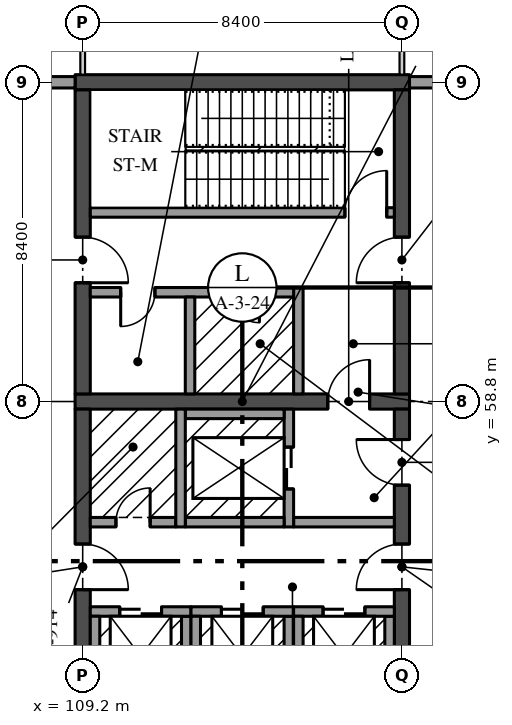
"""IFC4 building model, lengths in metres.
Left out: names, types, materials, properties, quantities, classifications, styles, units other than length and angle.
Written with IfcOpenShell. Run it as: python <this file> out.ifc"""

import sys

from ifc_helpers import new_model, si_unit, direction, frame, frame_2d, origin, place, context, subcontext, project, spatial, rectangle, extrude, element, fill, save


model = new_model("IFC4")
c1 = context("Model", 3, precision=1e-05, world=origin(), true_north=direction((0.0, 1.0)))
c2 = subcontext(c1, "Body", "Model", "MODEL_VIEW")
j1 = project(units=[si_unit("LENGTHUNIT", "METRE"), si_unit("PLANEANGLEUNIT", "RADIAN")], contexts=[c1])
p1 = place(None, origin())
s1 = spatial("IfcSite", under=j1, at=p1, CompositionType="ELEMENT")
p2 = place(p1, origin())
s2 = spatial("IfcBuilding", under=s1, at=p2, CompositionType="ELEMENT")
p3 = place(p2, frame((0.0, 0.0, 9.9)))
s3 = spatial("IfcBuildingStorey", under=s2, at=p3, CompositionType="ELEMENT", Elevation=9.9)
p4 = place(p3, frame((109.0, 58.8, 0.0), z_axis=(0.0, 0.0, 1.0), x_axis=(1.0, 0.0, 0.0)))
e1 = element("IfcWall", 1, at=p4, inside=s3, PredefinedType="SHEAR", context=c2, shape_type="SweptSolid", body=[
    extrude(rectangle(XDim=8.8, YDim=0.4, at=frame_2d((4.4, 0.0))), origin(), (0.0, 0.0, 1.0), 4.37),
])
p5 = place(p4, frame((6.65, 0.0, 0.0)))
e2 = element("IfcOpeningElement", 2, at=p5, cuts=e1, PredefinedType="OPENING", context=c2, shape_type="SweptSolid", body=[
    extrude(rectangle(XDim=1.1, YDim=2.1, at=frame_2d((0.55, 1.05))), frame((0.0, 0.21, 0.0), z_axis=(0.0, -1.0, 0.0), x_axis=(1.0, 0.0, 0.0)), (0.0, 0.0, 1.0), 0.42),
])
p6 = place(p3, frame((109.2, 50.6, 0.0), z_axis=(0.0, 0.0, 1.0), x_axis=(0.0, 1.0, 0.0)))
e3 = element("IfcWall", 3, at=p6, inside=s3, PredefinedType="SHEAR", context=c2, shape_type="SweptSolid", body=[
    extrude(rectangle(XDim=8.0, YDim=0.4, at=frame_2d((4.0, 0.0))), origin(), (0.0, 0.0, 1.0), 4.37),
])
p7 = place(p6, frame((3.25, 0.0, 0.0)))
e4 = element("IfcOpeningElement", 4, at=p7, cuts=e3, PredefinedType="OPENING", context=c2, shape_type="SweptSolid", body=[
    extrude(rectangle(XDim=1.2, YDim=2.1, at=frame_2d((0.6, 1.05))), frame((0.0, 0.21, 0.0), z_axis=(0.0, -1.0, 0.0), x_axis=(1.0, 0.0, 0.0)), (0.0, 0.0, 1.0), 0.42),
])
p8 = place(p3, frame((117.6, 50.6, 0.0), z_axis=(0.0, 0.0, 1.0), x_axis=(0.0, 1.0, 0.0)))
e5 = element("IfcWall", 5, at=p8, inside=s3, PredefinedType="SHEAR", context=c2, shape_type="SweptSolid", body=[
    extrude(rectangle(XDim=8.0, YDim=0.4, at=frame_2d((4.0, 0.0))), origin(), (0.0, 0.0, 1.0), 4.37),
])
p9 = place(p8, frame((3.25, 0.0, 0.0)))
e6 = element("IfcOpeningElement", 6, at=p9, cuts=e5, PredefinedType="OPENING", context=c2, shape_type="SweptSolid", body=[
    extrude(rectangle(XDim=1.2, YDim=2.1, at=frame_2d((0.6, 1.05))), frame((0.0, 0.21, 0.0), z_axis=(0.0, -1.0, 0.0), x_axis=(1.0, 0.0, 0.0)), (0.0, 0.0, 1.0), 0.42),
])
p10 = place(p8, frame((6.0, 0.0, 0.0)))
e7 = element("IfcOpeningElement", 7, at=p10, cuts=e5, PredefinedType="OPENING", context=c2, shape_type="SweptSolid", body=[
    extrude(rectangle(XDim=1.2, YDim=2.1, at=frame_2d((0.6, 1.05))), frame((0.0, 0.21, 0.0), z_axis=(0.0, -1.0, 0.0), x_axis=(1.0, 0.0, 0.0)), (0.0, 0.0, 1.0), 0.42),
])
p11 = place(p3, frame((109.4, 55.625, 0.0), z_axis=(0.0, 0.0, 1.0), x_axis=(1.0, 0.0, 0.0)))
e8 = element("IfcWall", 8, at=p11, inside=s3, PredefinedType="SOLIDWALL", context=c2, shape_type="SweptSolid", body=[
    extrude(rectangle(XDim=2.25, YDim=0.25, at=frame_2d((1.125, 0.0))), origin(), (0.0, 0.0, 1.0), 4.37),
])
p12 = place(p11, frame((0.675, 0.0, 0.0)))
e9 = element("IfcOpeningElement", 9, at=p12, cuts=e8, PredefinedType="OPENING", context=c2, shape_type="SweptSolid", body=[
    extrude(rectangle(XDim=0.9, YDim=2.1, at=frame_2d((0.45, 1.05))), frame((0.0, 0.135, 0.0), z_axis=(0.0, -1.0, 0.0), x_axis=(1.0, 0.0, 0.0)), (0.0, 0.0, 1.0), 0.27),
])
p13 = place(p3, frame((114.75, 55.625, 0.0), z_axis=(0.0, 0.0, 1.0), x_axis=(1.0, 0.0, 0.0)))
e10 = element("IfcWall", 10, at=p13, inside=s3, PredefinedType="SOLIDWALL", context=c2, shape_type="SweptSolid", body=[
    extrude(rectangle(XDim=2.65, YDim=0.25, at=frame_2d((1.325, 0.0))), origin(), (0.0, 0.0, 1.0), 4.37),
])
p14 = place(p3, frame((109.0, 67.2, 0.0), z_axis=(0.0, 0.0, 1.0), x_axis=(1.0, 0.0, 0.0)))
e11 = element("IfcWall", 11, at=p14, inside=s3, PredefinedType="SHEAR", context=c2, shape_type="SweptSolid", body=[
    extrude(rectangle(XDim=8.8, YDim=0.4, at=frame_2d((4.4, 0.0))), origin(), (0.0, 0.0, 1.0), 4.37),
])
p15 = place(p3, frame((109.2, 59.0, 0.0), z_axis=(0.0, 0.0, 1.0), x_axis=(0.0, 1.0, 0.0)))
e12 = element("IfcWall", 12, at=p15, inside=s3, PredefinedType="SHEAR", context=c2, shape_type="SweptSolid", body=[
    extrude(rectangle(XDim=8.0, YDim=0.4, at=frame_2d((4.0, 0.0))), origin(), (0.0, 0.0, 1.0), 4.37),
])
p16 = place(p15, frame((2.925, 0.0, 0.0)))
e13 = element("IfcOpeningElement", 13, at=p16, cuts=e12, PredefinedType="OPENING", context=c2, shape_type="SweptSolid", body=[
    extrude(rectangle(XDim=1.2, YDim=2.1, at=frame_2d((0.6, 1.05))), frame((0.0, 0.21, 0.0), z_axis=(0.0, -1.0, 0.0), x_axis=(1.0, 0.0, 0.0)), (0.0, 0.0, 1.0), 0.42),
])
p17 = place(p3, frame((117.6, 59.0, 0.0), z_axis=(0.0, 0.0, 1.0), x_axis=(0.0, 1.0, 0.0)))
e14 = element("IfcWall", 14, at=p17, inside=s3, PredefinedType="SHEAR", context=c2, shape_type="SweptSolid", body=[
    extrude(rectangle(XDim=8.0, YDim=0.4, at=frame_2d((4.0, 0.0))), origin(), (0.0, 0.0, 1.0), 4.37),
])
p18 = place(p17, frame((2.925, 0.0, 0.0)))
e15 = element("IfcOpeningElement", 15, at=p18, cuts=e14, PredefinedType="OPENING", context=c2, shape_type="SweptSolid", body=[
    extrude(rectangle(XDim=1.2, YDim=2.1, at=frame_2d((0.6, 1.05))), frame((0.0, 0.21, 0.0), z_axis=(0.0, -1.0, 0.0), x_axis=(1.0, 0.0, 0.0)), (0.0, 0.0, 1.0), 0.42),
])
p19 = place(p3, frame((117.4, 63.775, 0.0), z_axis=(0.0, 0.0, 1.0), x_axis=(-1.0, 0.0, 0.0)))
e16 = element("IfcWall", 16, at=p19, inside=s3, PredefinedType="SOLIDWALL", context=c2, shape_type="SweptSolid", body=[
    extrude(rectangle(XDim=8.0, YDim=0.25, at=frame_2d((4.0, 0.0))), origin(), (0.0, 0.0, 1.0), 4.37),
])
p20 = place(p19, frame((0.2, 0.0, 0.0)))
e17 = element("IfcOpeningElement", 17, at=p20, cuts=e16, PredefinedType="OPENING", context=c2, shape_type="SweptSolid", body=[
    extrude(rectangle(XDim=1.1, YDim=2.1, at=frame_2d((0.55, 1.05))), frame((0.0, 0.135, 0.0), z_axis=(0.0, -1.0, 0.0), x_axis=(1.0, 0.0, 0.0)), (0.0, 0.0, 1.0), 0.27),
])
p21 = place(p3, frame((114.875, 61.8, 0.0), z_axis=(0.0, 0.0, 1.0), x_axis=(0.0, -1.0, 0.0)))
e18 = element("IfcWall", 18, at=p21, inside=s3, PredefinedType="SOLIDWALL", context=c2, shape_type="SweptSolid", body=[
    extrude(rectangle(XDim=2.8, YDim=0.25, at=frame_2d((1.4, 0.0))), origin(), (0.0, 0.0, 1.0), 4.37),
])
p22 = place(p3, frame((114.75, 61.675, 0.0), z_axis=(0.0, 0.0, 1.0), x_axis=(-1.0, 0.0, 0.0)))
e19 = element("IfcWall", 19, at=p22, inside=s3, PredefinedType="SOLIDWALL", context=c2, shape_type="SweptSolid", body=[
    extrude(rectangle(XDim=5.35, YDim=0.25, at=frame_2d((2.675, 0.0))), origin(), (0.0, 0.0, 1.0), 4.37),
])
p23 = place(p22, frame((3.65, 0.0, 0.0)))
e20 = element("IfcOpeningElement", 20, at=p23, cuts=e19, PredefinedType="OPENING", context=c2, shape_type="SweptSolid", body=[
    extrude(rectangle(XDim=0.9, YDim=2.1, at=frame_2d((0.45, 1.05))), frame((0.0, 0.135, 0.0), z_axis=(0.0, -1.0, 0.0), x_axis=(1.0, 0.0, 0.0)), (0.0, 0.0, 1.0), 0.27),
])
p24 = place(p22, frame((0.9, 0.0, 0.0)))
e21 = element("IfcOpeningElement", 21, at=p24, cuts=e19, PredefinedType="OPENING", context=c2, shape_type="SweptSolid", body=[
    extrude(rectangle(XDim=0.8, YDim=2.1, at=frame_2d((0.4, 1.05))), frame((0.0, 0.135, 0.0), z_axis=(0.0, -1.0, 0.0), x_axis=(1.0, 0.0, 0.0)), (0.0, 0.0, 1.0), 0.27),
])
p25 = place(p3, frame((112.025, 61.55, 0.0), z_axis=(0.0, 0.0, 1.0), x_axis=(0.0, -1.0, 0.0)))
e22 = element("IfcWall", 22, at=p25, inside=s3, PredefinedType="SOLIDWALL", context=c2, shape_type="SweptSolid", body=[
    extrude(rectangle(XDim=2.55, YDim=0.25, at=frame_2d((1.275, 0.0))), origin(), (0.0, 0.0, 1.0), 4.37),
])
p26 = place(p3, frame((114.625, 55.5, 0.0), z_axis=(0.0, 0.0, 1.0), x_axis=(0.0, 1.0, 0.0)))
e23 = element("IfcWall", 23, at=p26, inside=s3, PredefinedType="SOLIDWALL", context=c2, shape_type="SweptSolid", body=[
    extrude(rectangle(XDim=3.1, YDim=0.25, at=frame_2d((1.55, 0.0))), origin(), (0.0, 0.0, 1.0), 4.37),
])
p27 = place(p26, frame((1.0, 0.0, 0.0)))
e24 = element("IfcOpeningElement", 24, at=p27, cuts=e23, PredefinedType="OPENING", context=c2, shape_type="SweptSolid", body=[
    extrude(rectangle(XDim=1.1, YDim=2.1, at=frame_2d((0.55, 1.05))), frame((0.0, 0.135, 0.0), z_axis=(0.0, -1.0, 0.0), x_axis=(1.0, 0.0, 0.0)), (0.0, 0.0, 1.0), 0.27),
])
for number, where, z_axis, x_axis in (
    (25, (111.9, 58.475, 0.0), (0.0, 0.0, 1.0), (1.0, 0.0, 0.0)),
    (26, (111.9, 55.625, 0.0), (0.0, 0.0, 1.0), (1.0, 0.0, 0.0)),
):
    element("IfcWall", number, at=place(p3, frame(where, z_axis=z_axis, x_axis=x_axis)), inside=s3, PredefinedType="SOLIDWALL", context=c2, shape_type="SweptSolid", body=[
        extrude(rectangle(XDim=2.6, YDim=0.25, at=frame_2d((1.3, 0.0))), origin(), (0.0, 0.0, 1.0), 4.37),
    ])
p28 = place(p3, frame((111.775, 55.5, 0.0), z_axis=(0.0, 0.0, 1.0), x_axis=(0.0, 1.0, 0.0)))
e27 = element("IfcWall", 27, at=p28, inside=s3, PredefinedType="SOLIDWALL", context=c2, shape_type="SweptSolid", body=[
    extrude(rectangle(XDim=3.1, YDim=0.25, at=frame_2d((1.55, 0.0))), origin(), (0.0, 0.0, 1.0), 4.37),
])
p29 = place(p3, frame((111.925, 50.85, 0.0), z_axis=(0.0, 0.0, 1.0), x_axis=(0.0, 1.0, 0.0)))
e28 = element("IfcWall", 28, at=p29, inside=s3, PredefinedType="SOLIDWALL", context=c2, shape_type="SweptSolid", body=[
    extrude(rectangle(XDim=2.3, YDim=0.25, at=frame_2d((1.15, 0.0))), origin(), (0.0, 0.0, 1.0), 4.37),
])
p30 = place(p3, frame((109.4, 53.275, 0.0), z_axis=(0.0, 0.0, 1.0), x_axis=(1.0, 0.0, 0.0)))
e29 = element("IfcWall", 29, at=p30, inside=s3, PredefinedType="SOLIDWALL", context=c2, shape_type="SweptSolid", body=[
    extrude(rectangle(XDim=2.65, YDim=0.25, at=frame_2d((1.325, 0.0))), origin(), (0.0, 0.0, 1.0), 4.37),
])
p31 = place(p30, frame((0.775, 0.0, 0.0)))
e30 = element("IfcOpeningElement", 30, at=p31, cuts=e29, PredefinedType="OPENING", context=c2, shape_type="SweptSolid", body=[
    extrude(rectangle(XDim=1.1, YDim=2.1, at=frame_2d((0.55, 1.05))), frame((0.0, 0.135, 0.0), z_axis=(0.0, -1.0, 0.0), x_axis=(1.0, 0.0, 0.0)), (0.0, 0.0, 1.0), 0.27),
])
for number, where, z_axis, x_axis in (
    (31, (109.525, 50.85, 0.0), (0.0, 0.0, 1.0), (0.0, 1.0, 0.0)),
    (32, (114.625, 50.85, 0.0), (0.0, 0.0, 1.0), (0.0, 1.0, 0.0)),
):
    element("IfcWall", number, at=place(p3, frame(where, z_axis=z_axis, x_axis=x_axis)), inside=s3, PredefinedType="SOLIDWALL", context=c2, shape_type="SweptSolid", body=[
        extrude(rectangle(XDim=2.3, YDim=0.25, at=frame_2d((1.15, 0.0))), origin(), (0.0, 0.0, 1.0), 4.37),
    ])
p32 = place(p3, frame((112.05, 53.275, 0.0), z_axis=(0.0, 0.0, 1.0), x_axis=(1.0, 0.0, 0.0)))
e33 = element("IfcWall", 33, at=p32, inside=s3, PredefinedType="SOLIDWALL", context=c2, shape_type="SweptSolid", body=[
    extrude(rectangle(XDim=2.7, YDim=0.25, at=frame_2d((1.35, 0.0))), origin(), (0.0, 0.0, 1.0), 4.37),
])
p33 = place(p32, frame((0.8, 0.0, 0.0)))
e34 = element("IfcOpeningElement", 34, at=p33, cuts=e33, PredefinedType="OPENING", context=c2, shape_type="SweptSolid", body=[
    extrude(rectangle(XDim=1.1, YDim=2.1, at=frame_2d((0.55, 1.05))), frame((0.0, 0.135, 0.0), z_axis=(0.0, -1.0, 0.0), x_axis=(1.0, 0.0, 0.0)), (0.0, 0.0, 1.0), 0.27),
])
for number, where, z_axis, x_axis in (
    (35, (112.175, 50.85, 0.0), (0.0, 0.0, 1.0), (0.0, 1.0, 0.0)),
    (36, (117.275, 50.85, 0.0), (0.0, 0.0, 1.0), (0.0, 1.0, 0.0)),
):
    element("IfcWall", number, at=place(p3, frame(where, z_axis=z_axis, x_axis=x_axis)), inside=s3, PredefinedType="SOLIDWALL", context=c2, shape_type="SweptSolid", body=[
        extrude(rectangle(XDim=2.3, YDim=0.25, at=frame_2d((1.15, 0.0))), origin(), (0.0, 0.0, 1.0), 4.37),
    ])
p34 = place(p3, frame((114.75, 53.275, 0.0), z_axis=(0.0, 0.0, 1.0), x_axis=(1.0, 0.0, 0.0)))
e37 = element("IfcWall", 37, at=p34, inside=s3, PredefinedType="SOLIDWALL", context=c2, shape_type="SweptSolid", body=[
    extrude(rectangle(XDim=2.65, YDim=0.25, at=frame_2d((1.325, 0.0))), origin(), (0.0, 0.0, 1.0), 4.37),
])
p35 = place(p34, frame((0.775, 0.0, 0.0)))
e38 = element("IfcOpeningElement", 38, at=p35, cuts=e37, PredefinedType="OPENING", context=c2, shape_type="SweptSolid", body=[
    extrude(rectangle(XDim=1.1, YDim=2.1, at=frame_2d((0.55, 1.05))), frame((0.0, 0.135, 0.0), z_axis=(0.0, -1.0, 0.0), x_axis=(1.0, 0.0, 0.0)), (0.0, 0.0, 1.0), 0.27),
])
p36 = place(p3, frame((114.875, 50.85, 0.0), z_axis=(0.0, 0.0, 1.0), x_axis=(0.0, 1.0, 0.0)))
e39 = element("IfcWall", 39, at=p36, inside=s3, PredefinedType="SOLIDWALL", context=c2, shape_type="SweptSolid", body=[
    extrude(rectangle(XDim=2.3, YDim=0.25, at=frame_2d((1.15, 0.0))), origin(), (0.0, 0.0, 1.0), 4.37),
])
for number, where, z_axis, x_axis in (
    (40, (109.2, 67.4, 0.0), (0.0, 0.0, 1.0), (0.0, 1.0, 0.0)),
    (41, (117.6, 67.4, 0.0), (0.0, 0.0, 1.0), (0.0, 1.0, 0.0)),
):
    element("IfcWall", number, at=place(p3, frame(where, z_axis=z_axis, x_axis=x_axis)), inside=s3, PredefinedType="PARTITIONING", context=c2, shape_type="SweptSolid", body=[
        extrude(rectangle(XDim=6.625, YDim=0.125, at=frame_2d((3.312, 0.0))), origin(), (0.0, 0.0, 1.0), 3.746),
    ])
for number, where, z_axis, x_axis in (
    (42, (125.999, 67.2, 0.0), (0.0, 0.0, 1.0), (-1.0, 0.0, 0.0)),
    (43, (109.0, 67.2, 0.0), (0.0, 0.0, 1.0), (-1.0, 0.0, 0.0)),
):
    element("IfcWall", number, at=place(p3, frame(where, z_axis=z_axis, x_axis=x_axis)), inside=s3, PredefinedType="SOLIDWALL", context=c2, shape_type="SweptSolid", body=[
        extrude(rectangle(XDim=8.198, YDim=0.3, at=frame_2d((4.099, 0.0))), origin(), (0.0, 0.0, 1.0), 3.746),
    ])
p37 = place(p7, frame((1.2, 0.0, 0.0), z_axis=(0.0, 0.0, 1.0), x_axis=(-1.0, 0.0, 0.0)))
e44 = element("IfcDoor", 44, at=p37, inside=s3, OperationType="SINGLE_SWING_LEFT", PredefinedType="DOOR", context=c2, shape_type="SweptSolid", body=[
    extrude(rectangle(XDim=1.2, YDim=2.1, at=frame_2d((0.6, 1.05))), frame((0.0, 0.035, 0.0), z_axis=(0.0, -1.0, 0.0), x_axis=(1.0, 0.0, 0.0)), (0.0, 0.0, 1.0), 0.07),
])
fill(e4, e44)
p38 = place(p9, origin())
e45 = element("IfcDoor", 45, at=p38, inside=s3, OperationType="SINGLE_SWING_RIGHT", PredefinedType="DOOR", context=c2, shape_type="SweptSolid", body=[
    extrude(rectangle(XDim=1.2, YDim=2.1, at=frame_2d((0.6, 1.05))), frame((0.0, 0.035, 0.0), z_axis=(0.0, -1.0, 0.0), x_axis=(1.0, 0.0, 0.0)), (0.0, 0.0, 1.0), 0.07),
])
fill(e6, e45)
p39 = place(p10, origin())
e46 = element("IfcDoor", 46, at=p39, inside=s3, OperationType="SINGLE_SWING_LEFT", PredefinedType="DOOR", context=c2, shape_type="SweptSolid", body=[
    extrude(rectangle(XDim=1.2, YDim=2.1, at=frame_2d((0.6, 1.05))), frame((0.0, 0.035, 0.0), z_axis=(0.0, -1.0, 0.0), x_axis=(1.0, 0.0, 0.0)), (0.0, 0.0, 1.0), 0.07),
])
fill(e7, e46)
p40 = place(p5, origin())
e47 = element("IfcDoor", 47, at=p40, inside=s3, OperationType="SINGLE_SWING_LEFT", PredefinedType="DOOR", context=c2, shape_type="SweptSolid", body=[
    extrude(rectangle(XDim=1.1, YDim=2.1, at=frame_2d((0.55, 1.05))), frame((0.0, 0.035, 0.0), z_axis=(0.0, -1.0, 0.0), x_axis=(1.0, 0.0, 0.0)), (0.0, 0.0, 1.0), 0.07),
])
fill(e2, e47)
p41 = place(p12, origin())
e48 = element("IfcDoor", 48, at=p41, inside=s3, OperationType="SINGLE_SWING_LEFT", PredefinedType="DOOR", context=c2, shape_type="SweptSolid", body=[
    extrude(rectangle(XDim=0.9, YDim=2.1, at=frame_2d((0.45, 1.05))), frame((0.0, 0.05, 0.0), z_axis=(0.0, -1.0, 0.0), x_axis=(1.0, 0.0, 0.0)), (0.0, 0.0, 1.0), 0.1),
])
fill(e9, e48)
p42 = place(p23, origin())
e49 = element("IfcDoor", 49, at=p42, inside=s3, OperationType="SINGLE_SWING_LEFT", PredefinedType="DOOR", context=c2, shape_type="SweptSolid", body=[
    extrude(rectangle(XDim=0.9, YDim=2.1, at=frame_2d((0.45, 1.05))), frame((0.0, 0.035, 0.0), z_axis=(0.0, -1.0, 0.0), x_axis=(1.0, 0.0, 0.0)), (0.0, 0.0, 1.0), 0.07),
])
fill(e20, e49)
p43 = place(p16, frame((1.2, 0.0, 0.0), z_axis=(0.0, 0.0, 1.0), x_axis=(-1.0, 0.0, 0.0)))
e50 = element("IfcDoor", 50, at=p43, inside=s3, OperationType="SINGLE_SWING_LEFT", PredefinedType="DOOR", context=c2, shape_type="SweptSolid", body=[
    extrude(rectangle(XDim=1.2, YDim=2.1, at=frame_2d((0.6, 1.05))), frame((0.0, 0.035, 0.0), z_axis=(0.0, -1.0, 0.0), x_axis=(1.0, 0.0, 0.0)), (0.0, 0.0, 1.0), 0.07),
])
fill(e13, e50)
p44 = place(p18, origin())
e51 = element("IfcDoor", 51, at=p44, inside=s3, OperationType="SINGLE_SWING_RIGHT", PredefinedType="DOOR", context=c2, shape_type="SweptSolid", body=[
    extrude(rectangle(XDim=1.2, YDim=2.1, at=frame_2d((0.6, 1.05))), frame((0.0, 0.035, 0.0), z_axis=(0.0, -1.0, 0.0), x_axis=(1.0, 0.0, 0.0)), (0.0, 0.0, 1.0), 0.07),
])
fill(e15, e51)
p45 = place(p24, origin())
e52 = element("IfcDoor", 52, at=p45, inside=s3, OperationType="SINGLE_SWING_RIGHT", PredefinedType="DOOR", context=c2, shape_type="SweptSolid", body=[
    extrude(rectangle(XDim=0.8, YDim=2.1, at=frame_2d((0.4, 1.05))), frame((0.0, 0.035, 0.0), z_axis=(0.0, -1.0, 0.0), x_axis=(1.0, 0.0, 0.0)), (0.0, 0.0, 1.0), 0.07),
])
fill(e21, e52)
p46 = place(p20, frame((1.1, 0.0, 0.0), z_axis=(0.0, 0.0, 1.0), x_axis=(-1.0, 0.0, 0.0)))
e53 = element("IfcDoor", 53, at=p46, inside=s3, OperationType="SINGLE_SWING_LEFT", PredefinedType="DOOR", context=c2, shape_type="SweptSolid", body=[
    extrude(rectangle(XDim=1.1, YDim=2.1, at=frame_2d((0.55, 1.05))), frame((0.0, 0.035, 0.0), z_axis=(0.0, -1.0, 0.0), x_axis=(1.0, 0.0, 0.0)), (0.0, 0.0, 1.0), 0.07),
])
fill(e17, e53)
p47 = place(p27, origin())
e54 = element("IfcDoor", 54, at=p47, inside=s3, OperationType="DOUBLE_DOOR_SLIDING", PredefinedType="DOOR", context=c2, shape_type="SweptSolid", body=[
    extrude(rectangle(XDim=1.1, YDim=2.1, at=frame_2d((0.55, 1.05))), frame((0.0, 0.04, 0.0), z_axis=(0.0, -1.0, 0.0), x_axis=(1.0, 0.0, 0.0)), (0.0, 0.0, 1.0), 0.08),
])
fill(e24, e54)
p48 = place(p31, origin())
e55 = element("IfcDoor", 55, at=p48, inside=s3, OperationType="DOUBLE_DOOR_SLIDING", PredefinedType="DOOR", context=c2, shape_type="SweptSolid", body=[
    extrude(rectangle(XDim=1.1, YDim=2.1, at=frame_2d((0.55, 1.05))), frame((0.0, 0.04, 0.0), z_axis=(0.0, -1.0, 0.0), x_axis=(1.0, 0.0, 0.0)), (0.0, 0.0, 1.0), 0.08),
])
fill(e30, e55)
p49 = place(p33, origin())
e56 = element("IfcDoor", 56, at=p49, inside=s3, OperationType="DOUBLE_DOOR_SLIDING", PredefinedType="DOOR", context=c2, shape_type="SweptSolid", body=[
    extrude(rectangle(XDim=1.1, YDim=2.1, at=frame_2d((0.55, 1.05))), frame((0.0, 0.04, 0.0), z_axis=(0.0, -1.0, 0.0), x_axis=(1.0, 0.0, 0.0)), (0.0, 0.0, 1.0), 0.08),
])
fill(e34, e56)
p50 = place(p35, origin())
e57 = element("IfcDoor", 57, at=p50, inside=s3, OperationType="DOUBLE_DOOR_SLIDING", PredefinedType="DOOR", context=c2, shape_type="SweptSolid", body=[
    extrude(rectangle(XDim=1.1, YDim=2.1, at=frame_2d((0.55, 1.05))), frame((0.0, 0.04, 0.0), z_axis=(0.0, -1.0, 0.0), x_axis=(1.0, 0.0, 0.0)), (0.0, 0.0, 1.0), 0.08),
])
fill(e38, e57)
save(model, sys.argv[1])
